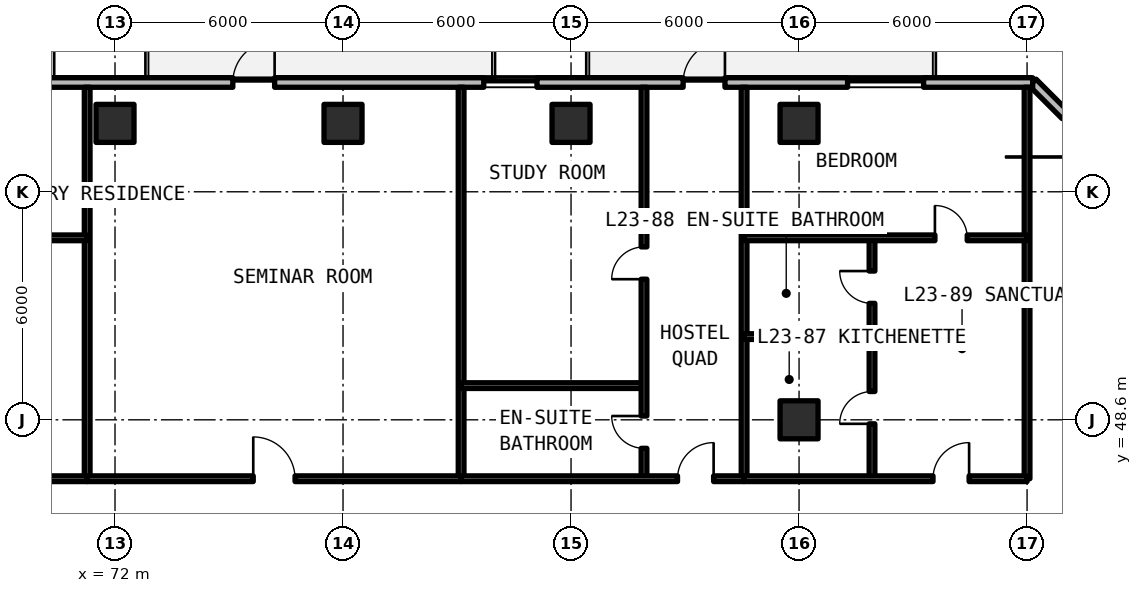
"""IFC4 building model, lengths in metres.
Left out: names, types, materials, properties, quantities, classifications, styles, units other than length and angle.
Written with IfcOpenShell. Run it as: python <this file> out.ifc"""

import sys

from ifc_helpers import new_model, si_unit, direction, frame, frame_2d, origin, origin_2d, place, context, subcontext, project, spatial, rectangle, extrude, element, fill, save


model = new_model("IFC4")
c1 = context("Model", 3, precision=1e-05, world=origin(), true_north=direction((0.0, 1.0)))
c2 = subcontext(c1, "Body", "Model", "MODEL_VIEW")
j1 = project(units=[si_unit("LENGTHUNIT", "METRE"), si_unit("PLANEANGLEUNIT", "RADIAN")], contexts=[c1])
p1 = place(None, origin())
s1 = spatial("IfcSite", under=j1, at=p1, CompositionType="ELEMENT")
p2 = place(p1, origin())
s2 = spatial("IfcBuilding", under=s1, at=p2, CompositionType="ELEMENT")
p3 = place(p2, frame((0.0, 0.0, 85.47)))
s3 = spatial("IfcBuildingStorey", under=s2, at=p3, CompositionType="ELEMENT", Elevation=85.47)
for number, where, z_axis, x_axis in (
    (1, (90.0, 48.6, 0.0), (0.0, 0.0, 1.0), (1.0, 0.0, 0.0)),
    (2, (72.0, 56.4, 0.0), (0.0, 0.0, 1.0), (1.0, 0.0, 0.0)),
    (3, (78.0, 56.4, 0.0), (0.0, 0.0, 1.0), (1.0, 0.0, 0.0)),
    (4, (84.0, 56.4, 0.0), (0.0, 0.0, 1.0), (1.0, 0.0, 0.0)),
    (5, (90.0, 56.4, 0.0), (0.0, 0.0, 1.0), (1.0, 0.0, 0.0)),
):
    element("IfcColumn", number, at=place(p3, frame(where, z_axis=z_axis, x_axis=x_axis)), inside=s3, PredefinedType="COLUMN", context=c2, shape_type="SweptSolid", body=[
        extrude(rectangle(XDim=1.0, YDim=1.0, at=origin_2d()), origin(), (0.0, 0.0, 1.0), 3.3),
    ])
p4 = place(p3, frame((100.275, 53.348, 0.0), z_axis=(0.0, 0.0, 1.0), x_axis=(-0.70708586489, 0.707127696864, 0.0)))
e6 = element("IfcWall", 6, at=p4, inside=s3, PredefinedType="SOLIDWALL", context=c2, shape_type="SweptSolid", body=[
    extrude(rectangle(XDim=5.836, YDim=0.25, at=frame_2d((2.918, 0.0))), origin(), (0.0, 0.0, 1.0), 3.08),
])
p5 = place(p4, frame((1.218, 0.0, 0.78)))
e7 = element("IfcOpeningElement", 7, at=p5, cuts=e6, PredefinedType="OPENING", context=c2, shape_type="SweptSolid", body=[
    extrude(rectangle(XDim=3.4, YDim=1.66, at=frame_2d((1.7, 0.83))), frame((0.0, 0.135, 0.0), z_axis=(0.0, -1.0, 0.0), x_axis=(1.0, 0.0, 0.0)), (0.0, 0.0, 1.0), 0.27),
])
p6 = place(p3, frame((96.148, 57.475, 0.0), z_axis=(0.0, 0.0, 1.0), x_axis=(-1.0, 0.0, 0.0)))
e8 = element("IfcWall", 8, at=p6, inside=s3, PredefinedType="SOLIDWALL", context=c2, shape_type="SweptSolid", body=[
    extrude(rectangle(XDim=44.023, YDim=0.25, at=frame_2d((22.012, 0.0))), origin(), (0.0, 0.0, 1.0), 3.08),
])
p7 = place(p6, frame((27.298, 0.0, 0.0)))
e9 = element("IfcOpeningElement", 9, at=p7, cuts=e8, PredefinedType="OPENING", context=c2, shape_type="SweptSolid", body=[
    extrude(rectangle(XDim=1.1, YDim=2.15, at=frame_2d((0.55, 1.075))), frame((0.0, 0.135, 0.0), z_axis=(0.0, -1.0, 0.0), x_axis=(1.0, 0.0, 0.0)), (0.0, 0.0, 1.0), 0.27),
])
p8 = place(p6, frame((19.948, 0.0, 0.0)))
e10 = element("IfcOpeningElement", 10, at=p8, cuts=e8, PredefinedType="OPENING", context=c2, shape_type="SweptSolid", body=[
    extrude(rectangle(XDim=1.1, YDim=2.15, at=frame_2d((0.55, 1.075))), frame((0.0, 0.135, 0.0), z_axis=(0.0, -1.0, 0.0), x_axis=(1.0, 0.0, 0.0)), (0.0, 0.0, 1.0), 0.27),
])
p9 = place(p6, frame((8.098, 0.0, 0.0)))
e11 = element("IfcOpeningElement", 11, at=p9, cuts=e8, PredefinedType="OPENING", context=c2, shape_type="SweptSolid", body=[
    extrude(rectangle(XDim=1.1, YDim=2.15, at=frame_2d((0.55, 1.075))), frame((0.0, 0.135, 0.0), z_axis=(0.0, -1.0, 0.0), x_axis=(1.0, 0.0, 0.0)), (0.0, 0.0, 1.0), 0.27),
])
p10 = place(p6, frame((39.336, 0.0, 0.78)))
e12 = element("IfcOpeningElement", 12, at=p10, cuts=e8, PredefinedType="OPENING", context=c2, shape_type="SweptSolid", body=[
    extrude(rectangle(XDim=2.0, YDim=1.66, at=frame_2d((1.0, 0.83))), frame((0.0, 0.135, 0.0), z_axis=(0.0, -1.0, 0.0), x_axis=(1.0, 0.0, 0.0)), (0.0, 0.0, 1.0), 0.27),
])
p11 = place(p6, frame((33.345, 0.0, 0.78)))
e13 = element("IfcOpeningElement", 13, at=p11, cuts=e8, PredefinedType="OPENING", context=c2, shape_type="SweptSolid", body=[
    extrude(rectangle(XDim=2.0, YDim=1.66, at=frame_2d((1.0, 0.83))), frame((0.0, 0.135, 0.0), z_axis=(0.0, -1.0, 0.0), x_axis=(1.0, 0.0, 0.0)), (0.0, 0.0, 1.0), 0.27),
])
p12 = place(p6, frame((13.044, 0.0, 0.78)))
e14 = element("IfcOpeningElement", 14, at=p12, cuts=e8, PredefinedType="OPENING", context=c2, shape_type="SweptSolid", body=[
    extrude(rectangle(XDim=1.4, YDim=1.65, at=frame_2d((0.7, 0.825))), frame((0.0, 0.135, 0.0), z_axis=(0.0, -1.0, 0.0), x_axis=(1.0, 0.0, 0.0)), (0.0, 0.0, 1.0), 0.27),
])
p13 = place(p6, frame((2.871, 0.0, 0.78)))
e15 = element("IfcOpeningElement", 15, at=p13, cuts=e8, PredefinedType="OPENING", context=c2, shape_type="SweptSolid", body=[
    extrude(rectangle(XDim=2.0, YDim=1.66, at=frame_2d((1.0, 0.83))), frame((0.0, 0.135, 0.0), z_axis=(0.0, -1.0, 0.0), x_axis=(1.0, 0.0, 0.0)), (0.0, 0.0, 1.0), 0.27),
])
for number, where, z_axis, x_axis in (
    (16, (96.0, 47.05, 0.0), (0.0, 0.0, 1.0), (0.0, 1.0, 0.0)),
    (17, (71.268, 47.05, 0.0), (0.0, 0.0, 1.0), (0.0, 1.0, 0.0)),
):
    element("IfcWall", number, at=place(p3, frame(where, z_axis=z_axis, x_axis=x_axis)), inside=s3, PredefinedType="SOLIDWALL", context=c2, shape_type="SweptSolid", body=[
        extrude(rectangle(XDim=10.3, YDim=0.15, at=frame_2d((5.15, 0.0))), origin(), (0.0, 0.0, 1.0), 2.35),
    ])
p14 = place(p3, frame((63.821, 53.388, 0.0), z_axis=(0.0, 0.0, 1.0), x_axis=(1.0, 0.0, 0.0)))
e18 = element("IfcWall", 18, at=p14, inside=s3, PredefinedType="PARTITIONING", context=c2, shape_type="SweptSolid", body=[
    extrude(rectangle(XDim=7.446, YDim=0.15, at=frame_2d((3.723, 0.0))), origin(), (0.0, 0.0, 1.0), 2.35),
])
p15 = place(p14, frame((5.387, 0.0, 0.0)))
e19 = element("IfcOpeningElement", 19, at=p15, cuts=e18, PredefinedType="OPENING", context=c2, shape_type="SweptSolid", body=[
    extrude(rectangle(XDim=0.85, YDim=2.1, at=frame_2d((0.425, 1.05))), frame((0.0, 0.085, 0.0), z_axis=(0.0, -1.0, 0.0), x_axis=(1.0, 0.0, 0.0)), (0.0, 0.0, 1.0), 0.17),
])
p16 = place(p3, frame((63.821, 47.05, 0.0), z_axis=(0.0, 0.0, 1.0), x_axis=(1.0, 0.0, 0.0)))
e20 = element("IfcWall", 20, at=p16, inside=s3, PredefinedType="SOLIDWALL", context=c2, shape_type="SweptSolid", body=[
    extrude(rectangle(XDim=7.446, YDim=0.15, at=frame_2d((3.723, 0.0))), origin(), (0.0, 0.0, 1.0), 2.35),
])
p17 = place(p16, frame((5.337, 0.0, 0.0)))
e21 = element("IfcOpeningElement", 21, at=p17, cuts=e20, PredefinedType="OPENING", context=c2, shape_type="SweptSolid", body=[
    extrude(rectangle(XDim=0.95, YDim=2.15, at=frame_2d((0.475, 1.075))), frame((0.0, 0.085, 0.0), z_axis=(0.0, -1.0, 0.0), x_axis=(1.0, 0.0, 0.0)), (0.0, 0.0, 1.0), 0.17),
])
p18 = place(p3, frame((81.107, 47.05, 0.0), z_axis=(0.0, 0.0, 1.0), x_axis=(0.0, 1.0, 0.0)))
e22 = element("IfcWall", 22, at=p18, inside=s3, PredefinedType="SOLIDWALL", context=c2, shape_type="SweptSolid", body=[
    extrude(rectangle(XDim=10.3, YDim=0.15, at=frame_2d((5.15, 0.0))), origin(), (0.0, 0.0, 1.0), 2.35),
])
p19 = place(p3, frame((71.268, 47.05, 0.0), z_axis=(0.0, 0.0, 1.0), x_axis=(1.0, 0.0, 0.0)))
e23 = element("IfcWall", 23, at=p19, inside=s3, PredefinedType="SOLIDWALL", context=c2, shape_type="SweptSolid", body=[
    extrude(rectangle(XDim=9.84, YDim=0.15, at=frame_2d((4.92, 0.0))), origin(), (0.0, 0.0, 1.0), 2.35),
])
p20 = place(p19, frame((4.37, 0.0, 0.0)))
e24 = element("IfcOpeningElement", 24, at=p20, cuts=e23, PredefinedType="OPENING", context=c2, shape_type="SweptSolid", body=[
    extrude(rectangle(XDim=1.1, YDim=2.15, at=frame_2d((0.55, 1.075))), frame((0.0, 0.085, 0.0), z_axis=(0.0, -1.0, 0.0), x_axis=(1.0, 0.0, 0.0)), (0.0, 0.0, 1.0), 0.17),
])
p21 = place(p3, frame((88.554, 47.05, 0.0), z_axis=(0.0, 0.0, 1.0), x_axis=(0.0, 1.0, 0.0)))
e25 = element("IfcWall", 25, at=p21, inside=s3, PredefinedType="SOLIDWALL", context=c2, shape_type="SweptSolid", body=[
    extrude(rectangle(XDim=10.3, YDim=0.15, at=frame_2d((5.15, 0.0))), origin(), (0.0, 0.0, 1.0), 2.35),
])
p22 = place(p3, frame((81.107, 49.5, 0.0), z_axis=(0.0, 0.0, 1.0), x_axis=(1.0, 0.0, 0.0)))
e26 = element("IfcWall", 26, at=p22, inside=s3, PredefinedType="PARTITIONING", context=c2, shape_type="SweptSolid", body=[
    extrude(rectangle(XDim=4.812, YDim=0.15, at=frame_2d((2.406, 0.0))), origin(), (0.0, 0.0, 1.0), 2.35),
])
p23 = place(p3, frame((85.92, 47.05, 0.0), z_axis=(0.0, 0.0, 1.0), x_axis=(0.0, 1.0, 0.0)))
e27 = element("IfcWall", 27, at=p23, inside=s3, PredefinedType="PARTITIONING", context=c2, shape_type="SweptSolid", body=[
    extrude(rectangle(XDim=10.3, YDim=0.15, at=frame_2d((5.15, 0.0))), origin(), (0.0, 0.0, 1.0), 2.35),
])
p24 = place(p23, frame((0.8, 0.0, 0.0)))
e28 = element("IfcOpeningElement", 28, at=p24, cuts=e27, PredefinedType="OPENING", context=c2, shape_type="SweptSolid", body=[
    extrude(rectangle(XDim=0.85, YDim=2.1, at=frame_2d((0.425, 1.05))), frame((0.0, 0.085, 0.0), z_axis=(0.0, -1.0, 0.0), x_axis=(1.0, 0.0, 0.0)), (0.0, 0.0, 1.0), 0.17),
])
p25 = place(p23, frame((5.25, 0.0, 0.0)))
e29 = element("IfcOpeningElement", 29, at=p25, cuts=e27, PredefinedType="OPENING", context=c2, shape_type="SweptSolid", body=[
    extrude(rectangle(XDim=0.85, YDim=2.1, at=frame_2d((0.425, 1.05))), frame((0.0, 0.085, 0.0), z_axis=(0.0, -1.0, 0.0), x_axis=(1.0, 0.0, 0.0)), (0.0, 0.0, 1.0), 0.17),
])
p26 = place(p3, frame((81.107, 47.05, 0.0), z_axis=(0.0, 0.0, 1.0), x_axis=(1.0, 0.0, 0.0)))
e30 = element("IfcWall", 30, at=p26, inside=s3, PredefinedType="SOLIDWALL", context=c2, shape_type="SweptSolid", body=[
    extrude(rectangle(XDim=7.446, YDim=0.15, at=frame_2d((3.723, 0.0))), origin(), (0.0, 0.0, 1.0), 2.35),
])
p27 = place(p26, frame((5.694, 0.0, 0.0)))
e31 = element("IfcOpeningElement", 31, at=p27, cuts=e30, PredefinedType="OPENING", context=c2, shape_type="SweptSolid", body=[
    extrude(rectangle(XDim=0.95, YDim=2.15, at=frame_2d((0.475, 1.075))), frame((0.0, 0.085, 0.0), z_axis=(0.0, -1.0, 0.0), x_axis=(1.0, 0.0, 0.0)), (0.0, 0.0, 1.0), 0.17),
])
p28 = place(p3, frame((88.554, 50.79, 0.0), z_axis=(0.0, 0.0, 1.0), x_axis=(1.0, 0.0, 0.0)))
e32 = element("IfcWall", 32, at=p28, inside=s3, PredefinedType="PARTITIONING", context=c2, shape_type="SweptSolid", body=[
    extrude(rectangle(XDim=3.366, YDim=0.15, at=frame_2d((1.683, 0.0))), origin(), (0.0, 0.0, 1.0), 2.35),
])
p29 = place(p3, frame((91.92, 47.05, 0.0), z_axis=(0.0, 0.0, 1.0), x_axis=(0.0, 1.0, 0.0)))
e33 = element("IfcWall", 33, at=p29, inside=s3, PredefinedType="PARTITIONING", context=c2, shape_type="SweptSolid", body=[
    extrude(rectangle(XDim=6.338, YDim=0.15, at=frame_2d((3.169, 0.0))), origin(), (0.0, 0.0, 1.0), 2.35),
])
p30 = place(p29, frame((1.445, 0.0, 0.0)))
e34 = element("IfcOpeningElement", 34, at=p30, cuts=e33, PredefinedType="OPENING", context=c2, shape_type="SweptSolid", body=[
    extrude(rectangle(XDim=0.85, YDim=2.1, at=frame_2d((0.425, 1.05))), frame((0.0, 0.085, 0.0), z_axis=(0.0, -1.0, 0.0), x_axis=(1.0, 0.0, 0.0)), (0.0, 0.0, 1.0), 0.17),
])
p31 = place(p29, frame((4.614, 0.0, 0.0)))
e35 = element("IfcOpeningElement", 35, at=p31, cuts=e33, PredefinedType="OPENING", context=c2, shape_type="SweptSolid", body=[
    extrude(rectangle(XDim=0.85, YDim=2.1, at=frame_2d((0.425, 1.05))), frame((0.0, 0.085, 0.0), z_axis=(0.0, -1.0, 0.0), x_axis=(1.0, 0.0, 0.0)), (0.0, 0.0, 1.0), 0.17),
])
p32 = place(p3, frame((88.554, 53.388, 0.0), z_axis=(0.0, 0.0, 1.0), x_axis=(1.0, 0.0, 0.0)))
e36 = element("IfcWall", 36, at=p32, inside=s3, PredefinedType="PARTITIONING", context=c2, shape_type="SweptSolid", body=[
    extrude(rectangle(XDim=7.446, YDim=0.15, at=frame_2d((3.723, 0.0))), origin(), (0.0, 0.0, 1.0), 2.35),
])
p33 = place(p32, frame((5.021, 0.0, 0.0)))
e37 = element("IfcOpeningElement", 37, at=p33, cuts=e36, PredefinedType="OPENING", context=c2, shape_type="SweptSolid", body=[
    extrude(rectangle(XDim=0.85, YDim=2.1, at=frame_2d((0.425, 1.05))), frame((0.0, 0.085, 0.0), z_axis=(0.0, -1.0, 0.0), x_axis=(1.0, 0.0, 0.0)), (0.0, 0.0, 1.0), 0.17),
])
p34 = place(p3, frame((88.554, 47.05, 0.0), z_axis=(0.0, 0.0, 1.0), x_axis=(1.0, 0.0, 0.0)))
e38 = element("IfcWall", 38, at=p34, inside=s3, PredefinedType="SOLIDWALL", context=c2, shape_type="SweptSolid", body=[
    extrude(rectangle(XDim=7.446, YDim=0.15, at=frame_2d((3.723, 0.0))), origin(), (0.0, 0.0, 1.0), 2.35),
])
p35 = place(p34, frame((4.971, 0.0, 0.0)))
e39 = element("IfcOpeningElement", 39, at=p35, cuts=e38, PredefinedType="OPENING", context=c2, shape_type="SweptSolid", body=[
    extrude(rectangle(XDim=0.95, YDim=2.15, at=frame_2d((0.475, 1.075))), frame((0.0, 0.085, 0.0), z_axis=(0.0, -1.0, 0.0), x_axis=(1.0, 0.0, 0.0)), (0.0, 0.0, 1.0), 0.17),
])
p36 = place(p8, frame((1.1, 0.0, 0.0), z_axis=(0.0, 0.0, 1.0), x_axis=(-1.0, 0.0, 0.0)))
e40 = element("IfcDoor", 40, at=p36, inside=s3, OperationType="SINGLE_SWING_RIGHT", PredefinedType="DOOR", context=c2, shape_type="SweptSolid", body=[
    extrude(rectangle(XDim=1.1, YDim=2.15, at=frame_2d((0.55, 1.075))), frame((0.0, 0.025, 0.0), z_axis=(0.0, -1.0, 0.0), x_axis=(1.0, 0.0, 0.0)), (0.0, 0.0, 1.0), 0.05),
])
fill(e10, e40)
p37 = place(p9, frame((1.1, 0.0, 0.0), z_axis=(0.0, 0.0, 1.0), x_axis=(-1.0, 0.0, 0.0)))
e41 = element("IfcDoor", 41, at=p37, inside=s3, OperationType="SINGLE_SWING_LEFT", PredefinedType="DOOR", context=c2, shape_type="SweptSolid", body=[
    extrude(rectangle(XDim=1.1, YDim=2.15, at=frame_2d((0.55, 1.075))), frame((0.0, 0.025, 0.0), z_axis=(0.0, -1.0, 0.0), x_axis=(1.0, 0.0, 0.0)), (0.0, 0.0, 1.0), 0.05),
])
fill(e11, e41)
p38 = place(p12, origin())
e42 = element("IfcWindow", 42, at=p38, inside=s3, PartitioningType="SINGLE_PANEL", PredefinedType="WINDOW", context=c2, shape_type="SweptSolid", body=[
    extrude(rectangle(XDim=1.4, YDim=1.65, at=frame_2d((0.7, 0.825))), frame((0.0, 0.03, 0.0), z_axis=(0.0, -1.0, 0.0), x_axis=(1.0, 0.0, 0.0)), (0.0, 0.0, 1.0), 0.06),
])
fill(e14, e42)
p39 = place(p13, origin())
e43 = element("IfcWindow", 43, at=p39, inside=s3, PartitioningType="SINGLE_PANEL", PredefinedType="WINDOW", context=c2, shape_type="SweptSolid", body=[
    extrude(rectangle(XDim=2.0, YDim=1.66, at=frame_2d((1.0, 0.83))), frame((0.0, 0.03, 0.0), z_axis=(0.0, -1.0, 0.0), x_axis=(1.0, 0.0, 0.0)), (0.0, 0.0, 1.0), 0.06),
])
fill(e15, e43)
p40 = place(p20, origin())
e44 = element("IfcDoor", 44, at=p40, inside=s3, OperationType="SINGLE_SWING_LEFT", PredefinedType="DOOR", context=c2, shape_type="SweptSolid", body=[
    extrude(rectangle(XDim=1.1, YDim=2.15, at=frame_2d((0.55, 1.075))), frame((0.0, 0.025, 0.0), z_axis=(0.0, -1.0, 0.0), x_axis=(1.0, 0.0, 0.0)), (0.0, 0.0, 1.0), 0.05),
])
fill(e24, e44)
p41 = place(p24, origin())
e45 = element("IfcDoor", 45, at=p41, inside=s3, OperationType="SINGLE_SWING_RIGHT", PredefinedType="DOOR", context=c2, shape_type="SweptSolid", body=[
    extrude(rectangle(XDim=0.85, YDim=2.1, at=frame_2d((0.425, 1.05))), frame((0.0, 0.025, 0.0), z_axis=(0.0, -1.0, 0.0), x_axis=(1.0, 0.0, 0.0)), (0.0, 0.0, 1.0), 0.05),
])
fill(e28, e45)
p42 = place(p25, origin())
e46 = element("IfcDoor", 46, at=p42, inside=s3, OperationType="SINGLE_SWING_LEFT", PredefinedType="DOOR", context=c2, shape_type="SweptSolid", body=[
    extrude(rectangle(XDim=0.85, YDim=2.1, at=frame_2d((0.425, 1.05))), frame((0.0, 0.025, 0.0), z_axis=(0.0, -1.0, 0.0), x_axis=(1.0, 0.0, 0.0)), (0.0, 0.0, 1.0), 0.05),
])
fill(e29, e46)
p43 = place(p27, origin())
e47 = element("IfcDoor", 47, at=p43, inside=s3, OperationType="SINGLE_SWING_RIGHT", PredefinedType="DOOR", context=c2, shape_type="SweptSolid", body=[
    extrude(rectangle(XDim=0.95, YDim=2.15, at=frame_2d((0.475, 1.075))), frame((0.0, 0.025, 0.0), z_axis=(0.0, -1.0, 0.0), x_axis=(1.0, 0.0, 0.0)), (0.0, 0.0, 1.0), 0.05),
])
fill(e31, e47)
p44 = place(p30, origin())
e48 = element("IfcDoor", 48, at=p44, inside=s3, OperationType="SINGLE_SWING_LEFT", PredefinedType="DOOR", context=c2, shape_type="SweptSolid", body=[
    extrude(rectangle(XDim=0.85, YDim=2.1, at=frame_2d((0.425, 1.05))), frame((0.0, 0.025, 0.0), z_axis=(0.0, -1.0, 0.0), x_axis=(1.0, 0.0, 0.0)), (0.0, 0.0, 1.0), 0.05),
])
fill(e34, e48)
p45 = place(p31, origin())
e49 = element("IfcDoor", 49, at=p45, inside=s3, OperationType="SINGLE_SWING_RIGHT", PredefinedType="DOOR", context=c2, shape_type="SweptSolid", body=[
    extrude(rectangle(XDim=0.85, YDim=2.1, at=frame_2d((0.425, 1.05))), frame((0.0, 0.025, 0.0), z_axis=(0.0, -1.0, 0.0), x_axis=(1.0, 0.0, 0.0)), (0.0, 0.0, 1.0), 0.05),
])
fill(e35, e49)
p46 = place(p33, origin())
e50 = element("IfcDoor", 50, at=p46, inside=s3, OperationType="SINGLE_SWING_LEFT", PredefinedType="DOOR", context=c2, shape_type="SweptSolid", body=[
    extrude(rectangle(XDim=0.85, YDim=2.1, at=frame_2d((0.425, 1.05))), frame((0.0, 0.025, 0.0), z_axis=(0.0, -1.0, 0.0), x_axis=(1.0, 0.0, 0.0)), (0.0, 0.0, 1.0), 0.05),
])
fill(e37, e50)
p47 = place(p35, origin())
e51 = element("IfcDoor", 51, at=p47, inside=s3, OperationType="SINGLE_SWING_RIGHT", PredefinedType="DOOR", context=c2, shape_type="SweptSolid", body=[
    extrude(rectangle(XDim=0.95, YDim=2.15, at=frame_2d((0.475, 1.075))), frame((0.0, 0.025, 0.0), z_axis=(0.0, -1.0, 0.0), x_axis=(1.0, 0.0, 0.0)), (0.0, 0.0, 1.0), 0.05),
])
fill(e39, e51)
save(model, sys.argv[1])
